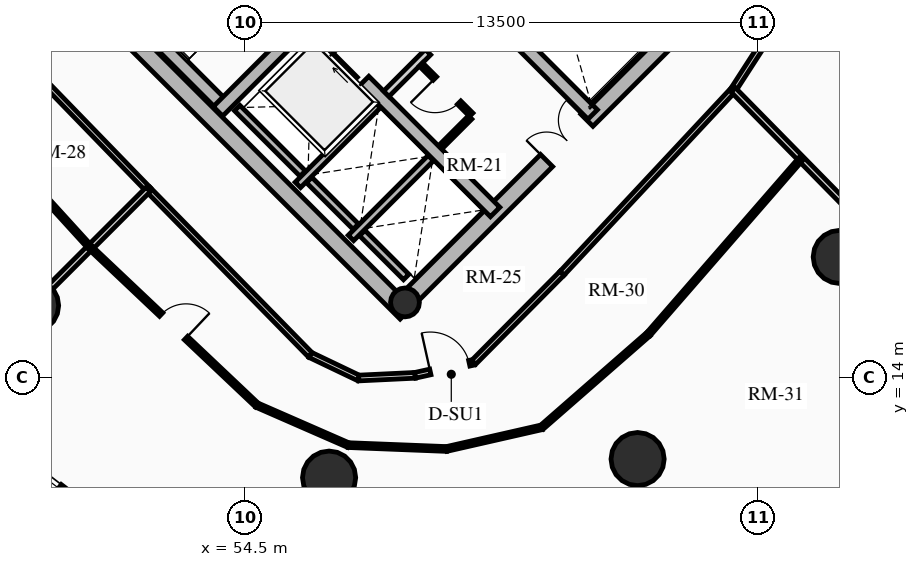
"""IFC4 building model, lengths in metres.
Left out: names, types, materials, properties, quantities, classifications, styles, units other than length and angle.
Written with IfcOpenShell. Run it as: python <this file> out.ifc"""

import sys

from ifc_helpers import new_model, si_unit, direction, frame, frame_2d, origin, origin_2d, place, context, subcontext, project, spatial, rectangle, circle, hollow_circle, extrude, source, transform, mapped, element, fill, save


model = new_model("IFC4")
c1 = context("Model", 3, precision=1e-05, world=origin(), true_north=direction((0.0, 1.0)))
c2 = subcontext(c1, "Body", "Model", "MODEL_VIEW")
j1 = project(units=[si_unit("LENGTHUNIT", "METRE"), si_unit("PLANEANGLEUNIT", "RADIAN")], contexts=[c1])
p1 = place(None, origin())
s1 = spatial("IfcSite", under=j1, at=p1, CompositionType="ELEMENT")
p2 = place(p1, origin())
s2 = spatial("IfcBuilding", under=s1, at=p2, CompositionType="ELEMENT")
p3 = place(p2, frame((0.0, 0.0, 90.52)))
s3 = spatial("IfcBuildingStorey", under=s2, at=p3, CompositionType="ELEMENT", Elevation=90.52)
p4 = place(p3, frame((58.737, 15.697, 0.0), z_axis=(0.0, 0.0, 1.0), x_axis=(-0.707106781187, 0.707106781187, 0.0)))
e1 = element("IfcWall", 1, at=p4, inside=s3, PredefinedType="SHEAR", context=c2, shape_type="SweptSolid", body=[
    extrude(rectangle(XDim=14.2, YDim=0.45, at=frame_2d((7.1, 0.0))), origin(), (0.0, 0.0, 1.0), 2.91),
])
p5 = place(p3, frame((58.578, 15.856, 0.0), z_axis=(0.0, 0.0, 1.0), x_axis=(0.707106781187, 0.707106781187, 0.0)))
e2 = element("IfcWall", 2, at=p5, inside=s3, PredefinedType="SHEAR", context=c2, shape_type="SweptSolid", body=[
    extrude(rectangle(XDim=10.7, YDim=0.45, at=frame_2d((5.35, 0.0))), origin(), (0.0, 0.0, 1.0), 2.91),
])
m1 = source(origin(), c2, "Body", "SweptSolid", [
    extrude(rectangle(XDim=1.5, YDim=2.02, at=frame_2d((0.75, 1.01))), frame((0.0, 0.235, 0.0), z_axis=(0.0, -1.0, 0.0), x_axis=(1.0, 0.0, 0.0)), (0.0, 0.0, 1.0), 0.47),
])
p6 = place(p5, frame((5.45, 0.0, 0.0)))
e3 = element("IfcOpeningElement", 3, at=p6, cuts=e2, PredefinedType="OPENING", context=c2, shape_type="MappedRepresentation", body=[
    mapped(m1, transform((0.0, 0.0, 0.0), x_axis=(1.0, 0.0, 0.0), y_axis=(0.0, 1.0, 0.0), z_axis=(0.0, 0.0, 1.0), scale=1.0)),
])
p7 = place(p3, frame((61.078, 18.355, 0.0), z_axis=(0.0, 0.0, 1.0), x_axis=(-0.707106781187, 0.707106781187, 0.0)))
e4 = element("IfcWall", 4, at=p7, inside=s3, PredefinedType="SHEAR", context=c2, shape_type="SweptSolid", body=[
    extrude(rectangle(XDim=13.75, YDim=0.35, at=frame_2d((6.875, 0.0))), origin(), (0.0, 0.0, 1.0), 2.91),
])
m2 = source(origin(), c2, "Body", "SweptSolid", [
    extrude(rectangle(XDim=1.1, YDim=2.015, at=frame_2d((0.55, 1.007))), frame((0.0, 0.185, 0.0), z_axis=(0.0, -1.0, 0.0), x_axis=(1.0, 0.0, 0.0)), (0.0, 0.0, 1.0), 0.37),
])
p8 = place(p7, frame((4.875, 0.0, 0.0)))
e5 = element("IfcOpeningElement", 5, at=p8, cuts=e4, PredefinedType="OPENING", context=c2, shape_type="MappedRepresentation", body=[
    mapped(m2, transform((0.0, 0.0, 0.0), x_axis=(1.0, 0.0, 0.0), y_axis=(0.0, 1.0, 0.0), z_axis=(0.0, 0.0, 1.0), scale=1.0)),
])
m3 = source(origin(), c2, "Body", "SweptSolid", [
    extrude(rectangle(XDim=1.15, YDim=2.02, at=frame_2d((0.575, 1.01))), frame((0.0, 0.185, 0.0), z_axis=(0.0, -1.0, 0.0), x_axis=(1.0, 0.0, 0.0)), (0.0, 0.0, 1.0), 0.37),
])
p9 = place(p7, frame((7.295, 0.0, 0.0)))
e6 = element("IfcOpeningElement", 6, at=p9, cuts=e4, PredefinedType="OPENING", context=c2, shape_type="MappedRepresentation", body=[
    mapped(m3, transform((0.0, 0.0, 0.0), x_axis=(1.0, 0.0, 0.0), y_axis=(0.0, 1.0, 0.0), z_axis=(0.0, 0.0, 1.0), scale=1.0)),
])
p10 = place(p3, frame((63.645, 20.922, 0.0), z_axis=(0.0, 0.0, 1.0), x_axis=(-0.707106781187, 0.707106781187, 0.0)))
e7 = element("IfcWall", 7, at=p10, inside=s3, PredefinedType="SHEAR", context=c2, shape_type="SweptSolid", body=[
    extrude(rectangle(XDim=13.75, YDim=0.35, at=frame_2d((6.875, 0.0))), origin(), (0.0, 0.0, 1.0), 2.91),
])
p11 = place(p10, frame((10.0, 0.0, 0.0)))
e8 = element("IfcOpeningElement", 8, at=p11, cuts=e7, PredefinedType="OPENING", context=c2, shape_type="MappedRepresentation", body=[
    mapped(m2, transform((0.0, 0.0, 0.0), x_axis=(1.0, 0.0, 0.0), y_axis=(0.0, 1.0, 0.0), z_axis=(0.0, 0.0, 1.0), scale=1.0)),
])
p12 = place(p10, frame((12.0, 0.0, 0.0)))
e9 = element("IfcOpeningElement", 9, at=p12, cuts=e7, PredefinedType="OPENING", context=c2, shape_type="MappedRepresentation", body=[
    mapped(m2, transform((0.0, 0.0, 0.0), x_axis=(1.0, 0.0, 0.0), y_axis=(0.0, 1.0, 0.0), z_axis=(0.0, 0.0, 1.0), scale=1.0)),
])
p13 = place(p10, frame((5.305, 0.0, 0.0)))
e10 = element("IfcOpeningElement", 10, at=p13, cuts=e7, PredefinedType="OPENING", context=c2, shape_type="MappedRepresentation", body=[
    mapped(m3, transform((0.0, 0.0, 0.0), x_axis=(1.0, 0.0, 0.0), y_axis=(0.0, 1.0, 0.0), z_axis=(0.0, 0.0, 1.0), scale=1.0)),
])
p14 = place(p3, frame((53.922, 21.141, 0.0), z_axis=(0.0, 0.0, 1.0), x_axis=(-0.707088616009, 0.707124945897, 0.0)))
e11 = element("IfcWall", 11, at=p14, inside=s3, PredefinedType="SHEAR", context=c2, shape_type="SweptSolid", body=[
    extrude(rectangle(XDim=6.72, YDim=0.35, at=frame_2d((3.36, 0.0))), origin(), (0.0, 0.0, 1.0), 2.91),
])
p15 = place(p3, frame((53.784, 21.003, 0.0), z_axis=(0.0, 0.0, 1.0), x_axis=(0.707106781187, 0.707106781187, 0.0)))
e12 = element("IfcWall", 12, at=p15, inside=s3, PredefinedType="SHEAR", context=c2, shape_type="SweptSolid", body=[
    extrude(rectangle(XDim=3.285, YDim=0.35, at=frame_2d((1.643, 0.0))), origin(), (0.0, 0.0, 1.0), 2.91),
])
p16 = place(p3, frame((58.706, 15.976, 0.0), z_axis=(0.0, 0.0, 1.0), x_axis=(0.707106781187, 0.707106781187, 0.0)))
e13 = element("IfcColumn", 13, at=p16, inside=s3, PredefinedType="COLUMN", context=c2, shape_type="SweptSolid", body=[
    extrude(hollow_circle(Radius=0.38, WallThickness=0.032, at=origin_2d()), origin(), (0.0, 0.0, 1.0), 2.91),
])
for number, where, z_axis, x_axis in (
    (14, (48.893, 15.893, 0.0), (0.0, 0.0, 1.0), (1.0, 0.0, 0.0)),
    (15, (56.709, 11.365, 0.0), (0.0, 0.0, 1.0), (1.0, 0.0, 0.0)),
    (16, (64.827, 11.854, 0.0), (0.0, 0.0, 1.0), (1.0, 0.0, 0.0)),
    (17, (70.146, 17.173, 0.0), (0.0, 0.0, 1.0), (1.0, 0.0, 0.0)),
):
    element("IfcColumn", number, at=place(p3, frame(where, z_axis=z_axis, x_axis=x_axis)), inside=s3, PredefinedType="USERDEFINED", context=c2, shape_type="SweptSolid", body=[
        extrude(circle(Radius=0.7, at=origin_2d()), origin(), (0.0, 0.0, 1.0), 2.91),
    ])
p17 = place(p3, frame((51.189, 9.855, 0.0), z_axis=(0.0, 0.0, 1.0), x_axis=(-0.791982052206, 0.61054437102, 0.0)))
e18 = element("IfcWall", 18, at=p17, inside=s3, PredefinedType="SOLIDWALL", context=c2, shape_type="SweptSolid", body=[
    extrude(rectangle(XDim=5.942, YDim=0.24, at=frame_2d((2.971, 0.0))), origin(), (0.0, 0.0, 1.0), 2.179),
])
m4 = source(origin(), c2, "Body", "SweptSolid", [
    extrude(rectangle(XDim=1.9, YDim=1.35, at=frame_2d((0.95, 0.675))), frame((0.0, 0.13, 0.0), z_axis=(0.0, -1.0, 0.0), x_axis=(1.0, 0.0, 0.0)), (0.0, 0.0, 1.0), 0.26),
])
p18 = place(p17, frame((2.021, 0.0, 0.65)))
e19 = element("IfcOpeningElement", 19, at=p18, cuts=e18, PredefinedType="OPENING", context=c2, shape_type="MappedRepresentation", body=[
    mapped(m4, transform((0.0, 0.0, 0.0), x_axis=(1.0, 0.0, 0.0), y_axis=(0.0, 1.0, 0.0), z_axis=(0.0, 0.0, 1.0), scale=1.0)),
])
p19 = place(p3, frame((55.888, 19.069, 0.0), z_axis=(0.0, 0.0, 1.0), x_axis=(0.707106781187, 0.707106781187, 0.0)))
e20 = element("IfcWall", 20, at=p19, inside=s3, PredefinedType="SHEAR", context=c2, shape_type="SweptSolid", body=[
    extrude(rectangle(XDim=2.97, YDim=0.2, at=frame_2d((1.485, 0.0))), origin(), (0.0, 0.0, 1.0), 2.91),
])
p20 = place(p3, frame((56.015, 19.366, 0.0), z_axis=(0.0, 0.0, 1.0), x_axis=(-0.707106781187, 0.707106781187, 0.0)))
e21 = element("IfcWall", 21, at=p20, inside=s3, PredefinedType="SHEAR", context=c2, shape_type="SweptSolid", body=[
    extrude(rectangle(XDim=2.44, YDim=0.2, at=frame_2d((1.22, 0.0))), origin(), (0.0, 0.0, 1.0), 2.91),
])
p21 = place(p3, frame((57.284, 17.673, 0.0), z_axis=(0.0, 0.0, 1.0), x_axis=(0.707147878904, 0.70706568108, 0.0)))
e22 = element("IfcWall", 22, at=p21, inside=s3, PredefinedType="SHEAR", context=c2, shape_type="SweptSolid", body=[
    extrude(rectangle(XDim=2.97, YDim=0.2, at=frame_2d((1.485, 0.0))), origin(), (0.0, 0.0, 1.0), 2.91),
])
p22 = place(p3, frame((57.412, 17.97, 0.0), z_axis=(0.0, 0.0, 1.0), x_axis=(-0.707106781187, 0.707106781187, 0.0)))
e23 = element("IfcWall", 23, at=p22, inside=s3, PredefinedType="SHEAR", context=c2, shape_type="SweptSolid", body=[
    extrude(rectangle(XDim=1.735, YDim=0.2, at=frame_2d((0.867, 0.0))), origin(), (0.0, 0.0, 1.0), 2.91),
])
p23 = place(p3, frame((58.737, 16.644, 0.0), z_axis=(0.0, 0.0, 1.0), x_axis=(-0.707032117043, 0.707181437447, 0.0)))
e24 = element("IfcWall", 24, at=p23, inside=s3, PredefinedType="SHEAR", context=c2, shape_type="SweptSolid", body=[
    extrude(rectangle(XDim=1.635, YDim=0.2, at=frame_2d((0.817, 0.0))), origin(), (0.0, 0.0, 1.0), 2.91),
])
p24 = place(p3, frame((58.214, 21.467, 0.0), z_axis=(0.0, 0.0, 1.0), x_axis=(0.707106781187, 0.707106781187, 0.0)))
e25 = element("IfcWall", 25, at=p24, inside=s3, PredefinedType="PARTITIONING", context=c2, shape_type="SweptSolid", body=[
    extrude(rectangle(XDim=3.28, YDim=0.2, at=frame_2d((1.64, 0.0))), origin(), (0.0, 0.0, 1.0), 2.655),
])
m5 = source(origin(), c2, "Body", "SweptSolid", [
    extrude(rectangle(XDim=1.5, YDim=2.02, at=frame_2d((0.75, 1.01))), frame((0.0, 0.11, 0.0), z_axis=(0.0, -1.0, 0.0), x_axis=(1.0, 0.0, 0.0)), (0.0, 0.0, 1.0), 0.22),
])
p25 = place(p24, frame((1.55, 0.0, 0.0)))
e26 = element("IfcOpeningElement", 26, at=p25, cuts=e25, PredefinedType="OPENING", context=c2, shape_type="MappedRepresentation", body=[
    mapped(m5, transform((0.0, 0.0, 0.0), x_axis=(1.0, 0.0, 0.0), y_axis=(0.0, 1.0, 0.0), z_axis=(0.0, 0.0, 1.0), scale=1.0)),
])
p26 = place(p3, frame((60.448, 20.915, 0.0), z_axis=(0.0, 0.0, 1.0), x_axis=(-0.707106781187, 0.707106781187, 0.0)))
e27 = element("IfcWall", 27, at=p26, inside=s3, PredefinedType="PARTITIONING", context=c2, shape_type="SweptSolid", body=[
    extrude(rectangle(XDim=1.87, YDim=0.125, at=frame_2d((0.935, 0.0))), origin(), (0.0, 0.0, 1.0), 2.655),
])
m6 = source(origin(), c2, "Body", "SweptSolid", [
    extrude(rectangle(XDim=0.9, YDim=2.005, at=frame_2d((0.45, 1.002))), frame((0.0, 0.073, 0.0), z_axis=(0.0, -1.0, 0.0), x_axis=(1.0, 0.0, 0.0)), (0.0, 0.0, 1.0), 0.145),
])
p27 = place(p26, frame((0.45, 0.0, 0.0)))
e28 = element("IfcOpeningElement", 28, at=p27, cuts=e27, PredefinedType="OPENING", context=c2, shape_type="MappedRepresentation", body=[
    mapped(m6, transform((0.0, 0.0, 0.0), x_axis=(1.0, 0.0, 0.0), y_axis=(0.0, 1.0, 0.0), z_axis=(0.0, 0.0, 1.0), scale=1.0)),
])
p28 = place(p3, frame((59.643, 20.066, 0.0), z_axis=(0.0, 0.0, 1.0), x_axis=(0.707106781187, 0.707106781187, 0.0)))
e29 = element("IfcWall", 29, at=p28, inside=s3, PredefinedType="PARTITIONING", context=c2, shape_type="SweptSolid", body=[
    extrude(rectangle(XDim=1.1, YDim=0.125, at=frame_2d((0.55, 0.0))), origin(), (0.0, 0.0, 1.0), 2.655),
])
p29 = place(p3, frame((47.786, 23.242, 0.0), z_axis=(0.0, 0.0, 1.0), x_axis=(0.696183456981, -0.717863910659, 0.0)))
e30 = element("IfcWall", 30, at=p29, inside=s3, PredefinedType="PARTITIONING", context=c2, shape_type="SweptSolid", body=[
    extrude(rectangle(XDim=5.979, YDim=0.15, at=frame_2d((2.99, 0.0))), origin(), (0.0, 0.0, 1.0), 2.655),
])
p30 = place(p3, frame((51.949, 18.949, 0.0), z_axis=(0.0, 0.0, 1.0), x_axis=(0.699801520154, -0.714337337951, 0.0)))
e31 = element("IfcWall", 31, at=p30, inside=s3, PredefinedType="PARTITIONING", context=c2, shape_type="SweptSolid", body=[
    extrude(rectangle(XDim=6.097, YDim=0.15, at=frame_2d((3.048, 0.0))), origin(), (0.0, 0.0, 1.0), 2.225),
])
p31 = place(p3, frame((56.216, 14.594, 0.0), z_axis=(0.0, 0.0, 1.0), x_axis=(0.902219207281, -0.431277755064, 0.0)))
e32 = element("IfcWall", 32, at=p31, inside=s3, PredefinedType="PARTITIONING", context=c2, shape_type="SweptSolid", body=[
    extrude(rectangle(XDim=1.41, YDim=0.15, at=frame_2d((0.705, 0.0))), origin(), (0.0, 0.0, 1.0), 2.225),
])
p32 = place(p3, frame((57.488, 13.986, 0.0), z_axis=(0.0, 0.0, 1.0), x_axis=(0.998863298217, 0.047666670476, 0.0)))
e33 = element("IfcWall", 33, at=p32, inside=s3, PredefinedType="PARTITIONING", context=c2, shape_type="SweptSolid", body=[
    extrude(rectangle(XDim=1.485, YDim=0.15, at=frame_2d((0.743, 0.0))), origin(), (0.0, 0.0, 1.0), 2.225),
])
p33 = place(p3, frame((58.971, 14.057, 0.0), z_axis=(0.0, 0.0, 1.0), x_axis=(0.976085233804, 0.217388169756, 0.0)))
e34 = element("IfcWall", 34, at=p33, inside=s3, PredefinedType="PARTITIONING", context=c2, shape_type="SweptSolid", body=[
    extrude(rectangle(XDim=1.581, YDim=0.15, at=frame_2d((0.791, 0.0))), origin(), (0.0, 0.0, 1.0), 2.225),
])
m7 = source(origin(), c2, "Body", "SweptSolid", [
    extrude(rectangle(XDim=1.05, YDim=2.015, at=frame_2d((0.525, 1.007))), frame((0.0, 0.085, 0.0), z_axis=(0.0, -1.0, 0.0), x_axis=(1.0, 0.0, 0.0)), (0.0, 0.0, 1.0), 0.17),
])
p34 = place(p33, frame((0.411, 0.0, 0.0)))
e35 = element("IfcOpeningElement", 35, at=p34, cuts=e34, PredefinedType="OPENING", context=c2, shape_type="MappedRepresentation", body=[
    mapped(m7, transform((0.0, 0.0, 0.0), x_axis=(1.0, 0.0, 0.0), y_axis=(0.0, 1.0, 0.0), z_axis=(0.0, 0.0, 1.0), scale=1.0)),
])
p35 = place(p3, frame((60.515, 14.401, 0.0), z_axis=(0.0, 0.0, 1.0), x_axis=(0.704179607439, 0.710021887316, 0.0)))
e36 = element("IfcWall", 36, at=p35, inside=s3, PredefinedType="PARTITIONING", context=c2, shape_type="SweptSolid", body=[
    extrude(rectangle(XDim=3.301, YDim=0.15, at=frame_2d((1.651, 0.0))), origin(), (0.0, 0.0, 1.0), 2.225),
])
p36 = place(p3, frame((62.839, 16.745, 0.0), z_axis=(0.0, 0.0, 1.0), x_axis=(0.682386779427, 0.73099130177, 0.0)))
e37 = element("IfcWall", 37, at=p36, inside=s3, PredefinedType="PARTITIONING", context=c2, shape_type="SweptSolid", body=[
    extrude(rectangle(XDim=6.6, YDim=0.15, at=frame_2d((3.3, 0.0))), origin(), (0.0, 0.0, 1.0), 2.225),
])
p37 = place(p3, frame((67.343, 21.569, 0.0), z_axis=(0.0, 0.0, 1.0), x_axis=(0.542722446786, 0.83991210597, 0.0)))
e38 = element("IfcWall", 38, at=p37, inside=s3, PredefinedType="PARTITIONING", context=c2, shape_type="SweptSolid", body=[
    extrude(rectangle(XDim=1.876, YDim=0.15, at=frame_2d((0.938, 0.0))), origin(), (0.0, 0.0, 1.0), 2.225),
])
p38 = place(p3, frame((51.949, 18.949, 0.0), z_axis=(0.0, 0.0, 1.0), x_axis=(-0.707106781187, -0.707106781187, 0.0)))
e39 = element("IfcWall", 39, at=p38, inside=s3, PredefinedType="PARTITIONING", context=c2, shape_type="SweptSolid", body=[
    extrude(rectangle(XDim=7.711, YDim=0.16, at=frame_2d((3.855, 0.0))), origin(), (0.0, 0.0, 1.0), 2.179),
])
p39 = place(p3, frame((67.343, 21.569, 0.0), z_axis=(0.0, 0.0, 1.0), x_axis=(0.700899237588, -0.713260302238, 0.0)))
e40 = element("IfcWall", 40, at=p39, inside=s3, PredefinedType="PARTITIONING", context=c2, shape_type="SweptSolid", body=[
    extrude(rectangle(XDim=9.085, YDim=0.16, at=frame_2d((4.543, 0.0))), origin(), (0.0, 0.0, 1.0), 2.179),
])
p40 = place(p3, frame((46.41, 21.83, 0.0), z_axis=(0.0, 0.0, 1.0), x_axis=(0.6732109009, -0.739450527696, 0.0)))
e41 = element("IfcWall", 41, at=p40, inside=s3, PredefinedType="PARTITIONING", context=c2, shape_type="SweptSolid", body=[
    extrude(rectangle(XDim=5.96, YDim=0.125, at=frame_2d((2.98, 0.0))), origin(), (0.0, 0.0, 1.0), 2.655),
])
p41 = place(p3, frame((50.423, 17.423, 0.0), z_axis=(0.0, 0.0, 1.0), x_axis=(0.726497320663, -0.68716929724, 0.0)))
e42 = element("IfcWall", 42, at=p41, inside=s3, PredefinedType="PARTITIONING", context=c2, shape_type="SweptSolid", body=[
    extrude(rectangle(XDim=6.04, YDim=0.125, at=frame_2d((3.02, 0.0))), origin(), (0.0, 0.0, 1.0), 2.225),
])
p42 = place(p41, frame((2.57, 0.0, 0.0)))
e43 = element("IfcOpeningElement", 43, at=p42, cuts=e42, PredefinedType="OPENING", context=c2, shape_type="MappedRepresentation", body=[
    mapped(m6, transform((0.0, 0.0, 0.0), x_axis=(1.0, 0.0, 0.0), y_axis=(0.0, 1.0, 0.0), z_axis=(0.0, 0.0, 1.0), scale=1.0)),
])
p43 = place(p3, frame((54.811, 13.272, 0.0), z_axis=(0.0, 0.0, 1.0), x_axis=(0.91625765715, -0.400589447831, 0.0)))
e44 = element("IfcWall", 44, at=p43, inside=s3, PredefinedType="PARTITIONING", context=c2, shape_type="SweptSolid", body=[
    extrude(rectangle(XDim=2.624, YDim=0.125, at=frame_2d((1.312, 0.0))), origin(), (0.0, 0.0, 1.0), 2.225),
])
p44 = place(p3, frame((57.215, 12.221, 0.0), z_axis=(0.0, 0.0, 1.0), x_axis=(0.999225050732, -0.039361122818, 0.0)))
e45 = element("IfcWall", 45, at=p44, inside=s3, PredefinedType="PARTITIONING", context=c2, shape_type="SweptSolid", body=[
    extrude(rectangle(XDim=2.586, YDim=0.125, at=frame_2d((1.293, 0.0))), origin(), (0.0, 0.0, 1.0), 2.655),
])
p45 = place(p3, frame((59.8, 12.119, 0.0), z_axis=(0.0, 0.0, 1.0), x_axis=(0.975045061532, 0.222007044895, 0.0)))
e46 = element("IfcWall", 46, at=p45, inside=s3, PredefinedType="PARTITIONING", context=c2, shape_type="SweptSolid", body=[
    extrude(rectangle(XDim=2.57, YDim=0.125, at=frame_2d((1.285, 0.0))), origin(), (0.0, 0.0, 1.0), 2.225),
])
p46 = place(p3, frame((62.306, 12.689, 0.0), z_axis=(0.0, 0.0, 1.0), x_axis=(0.753127589311, 0.657874482115, 0.0)))
e47 = element("IfcWall", 47, at=p46, inside=s3, PredefinedType="PARTITIONING", context=c2, shape_type="SweptSolid", body=[
    extrude(rectangle(XDim=3.732, YDim=0.125, at=frame_2d((1.866, 0.0))), origin(), (0.0, 0.0, 1.0), 2.225),
])
p47 = place(p3, frame((65.116, 15.145, 0.0), z_axis=(0.0, 0.0, 1.0), x_axis=(0.656272685344, 0.75452379848, 0.0)))
e48 = element("IfcWall", 48, at=p47, inside=s3, PredefinedType="PARTITIONING", context=c2, shape_type="SweptSolid", body=[
    extrude(rectangle(XDim=6.11, YDim=0.125, at=frame_2d((3.055, 0.0))), origin(), (0.0, 0.0, 1.0), 2.225),
])
m8 = source(origin(), c2, "Body", "SweptSolid", [
    extrude(rectangle(XDim=1.9, YDim=1.35, at=frame_2d((0.95, 0.675))), frame((0.0, 0.03, 0.0), z_axis=(0.0, -1.0, 0.0), x_axis=(1.0, 0.0, 0.0)), (0.0, 0.0, 1.0), 0.06),
])
p48 = place(p18, origin())
e49 = element("IfcWindow", 49, at=p48, inside=s3, PartitioningType="DOUBLE_PANEL_VERTICAL", PredefinedType="WINDOW", context=c2, shape_type="MappedRepresentation", body=[
    mapped(m8, transform((0.0, 0.0, 0.0), x_axis=(1.0, 0.0, 0.0), y_axis=(0.0, 1.0, 0.0), z_axis=(0.0, 0.0, 1.0), scale=1.0)),
])
fill(e19, e49)
m9 = source(origin(), c2, "Body", "SweptSolid", [
    extrude(rectangle(XDim=1.1, YDim=2.015, at=frame_2d((0.55, 1.007))), frame((0.0, 0.025, 0.0), z_axis=(0.0, -1.0, 0.0), x_axis=(1.0, 0.0, 0.0)), (0.0, 0.0, 1.0), 0.05),
])
p49 = place(p8, origin())
e50 = element("IfcDoor", 50, at=p49, inside=s3, OperationType="SLIDING_TO_RIGHT", PredefinedType="DOOR", context=c2, shape_type="MappedRepresentation", body=[
    mapped(m9, transform((0.0, 0.0, 0.0), x_axis=(1.0, 0.0, 0.0), y_axis=(0.0, 1.0, 0.0), z_axis=(0.0, 0.0, 1.0), scale=1.0)),
])
fill(e5, e50)
m10 = source(origin(), c2, "Body", "SweptSolid", [
    extrude(rectangle(XDim=1.5, YDim=2.02, at=frame_2d((0.75, 1.01))), frame((0.0, 0.025, 0.0), z_axis=(0.0, -1.0, 0.0), x_axis=(1.0, 0.0, 0.0)), (0.0, 0.0, 1.0), 0.05),
])
p50 = place(p6, origin())
e51 = element("IfcDoor", 51, at=p50, inside=s3, OperationType="DOUBLE_DOOR_SINGLE_SWING", PredefinedType="DOOR", context=c2, shape_type="MappedRepresentation", body=[
    mapped(m10, transform((0.0, 0.0, 0.0), x_axis=(1.0, 0.0, 0.0), y_axis=(0.0, 1.0, 0.0), z_axis=(0.0, 0.0, 1.0), scale=1.0)),
])
fill(e3, e51)
p51 = place(p25, origin())
e52 = element("IfcDoor", 52, at=p51, inside=s3, OperationType="DOUBLE_DOOR_SINGLE_SWING", PredefinedType="DOOR", context=c2, shape_type="MappedRepresentation", body=[
    mapped(m10, transform((0.0, 0.0, 0.0), x_axis=(1.0, 0.0, 0.0), y_axis=(0.0, 1.0, 0.0), z_axis=(0.0, 0.0, 1.0), scale=1.0)),
])
fill(e26, e52)
m11 = source(origin(), c2, "Body", "SweptSolid", [
    extrude(rectangle(XDim=0.9, YDim=2.005, at=frame_2d((0.45, 1.002))), frame((0.0, 0.025, 0.0), z_axis=(0.0, -1.0, 0.0), x_axis=(1.0, 0.0, 0.0)), (0.0, 0.0, 1.0), 0.05),
])
p52 = place(p27, origin())
e53 = element("IfcDoor", 53, at=p52, inside=s3, OperationType="SINGLE_SWING_RIGHT", PredefinedType="DOOR", context=c2, shape_type="MappedRepresentation", body=[
    mapped(m11, transform((0.0, 0.0, 0.0), x_axis=(1.0, 0.0, 0.0), y_axis=(0.0, 1.0, 0.0), z_axis=(0.0, 0.0, 1.0), scale=1.0)),
])
fill(e28, e53)
m12 = source(origin(), c2, "Body", "SweptSolid", [
    extrude(rectangle(XDim=1.05, YDim=2.015, at=frame_2d((0.525, 1.007))), frame((0.0, 0.025, 0.0), z_axis=(0.0, -1.0, 0.0), x_axis=(1.0, 0.0, 0.0)), (0.0, 0.0, 1.0), 0.05),
])
p53 = place(p34, origin())
e54 = element("IfcDoor", 54, at=p53, inside=s3, OperationType="SINGLE_SWING_LEFT", PredefinedType="DOOR", context=c2, shape_type="MappedRepresentation", body=[
    mapped(m12, transform((0.0, 0.0, 0.0), x_axis=(1.0, 0.0, 0.0), y_axis=(0.0, 1.0, 0.0), z_axis=(0.0, 0.0, 1.0), scale=1.0)),
])
fill(e35, e54)
p54 = place(p42, origin())
e55 = element("IfcDoor", 55, at=p54, inside=s3, OperationType="SINGLE_SWING_RIGHT", PredefinedType="DOOR", context=c2, shape_type="MappedRepresentation", body=[
    mapped(m11, transform((0.0, 0.0, 0.0), x_axis=(1.0, 0.0, 0.0), y_axis=(0.0, 1.0, 0.0), z_axis=(0.0, 0.0, 1.0), scale=1.0)),
])
fill(e43, e55)
save(model, sys.argv[1])
